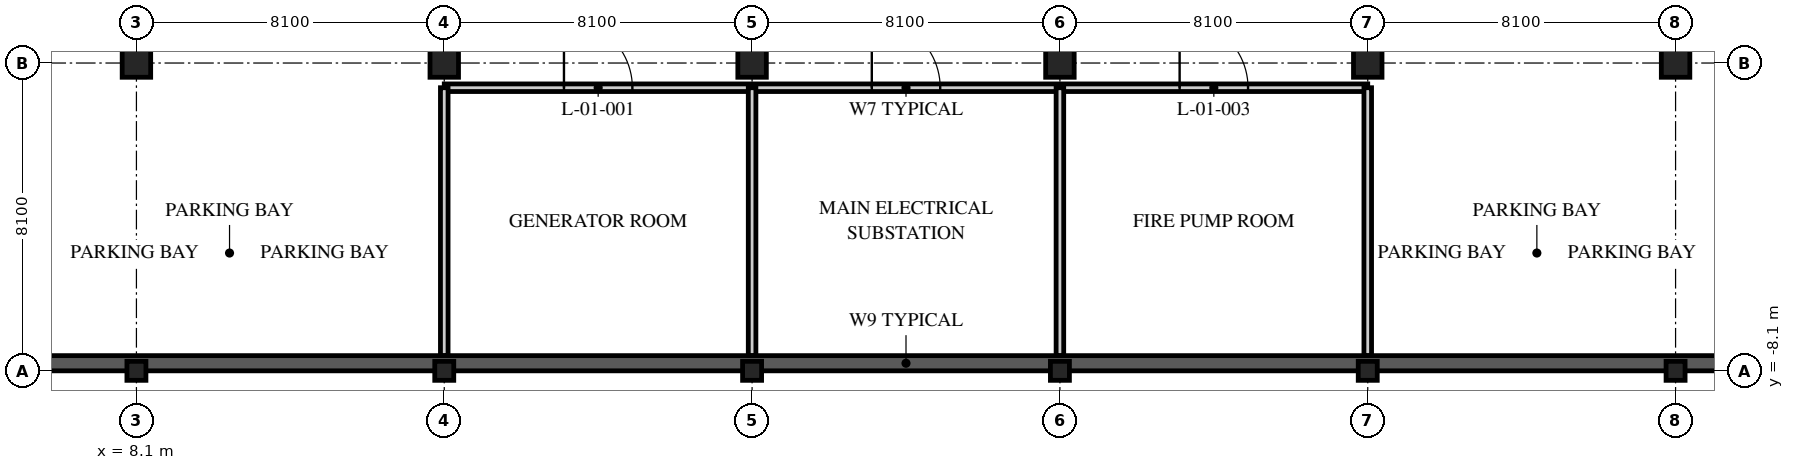
"""IFC4 building model, lengths in metres.
Left out: names, types, materials, properties, quantities, classifications, styles, units other than length and angle.
Written with IfcOpenShell. Run it as: python <this file> out.ifc"""

import sys

from ifc_helpers import new_model, si_unit, direction, frame, frame_2d, origin, origin_2d, place, context, subcontext, project, spatial, rectangle, hollow_rectangle, extrude, element, fill, save


model = new_model("IFC4")
c1 = context("Model", 3, precision=1e-05, world=origin(), true_north=direction((0.0, 1.0)))
c2 = subcontext(c1, "Body", "Model", "MODEL_VIEW")
j1 = project(units=[si_unit("LENGTHUNIT", "METRE"), si_unit("PLANEANGLEUNIT", "RADIAN")], contexts=[c1])
p1 = place(None, origin())
s1 = spatial("IfcSite", under=j1, at=p1, CompositionType="ELEMENT")
p2 = place(p1, origin())
s2 = spatial("IfcBuilding", under=s1, at=p2, CompositionType="ELEMENT")
p3 = place(p2, frame((0.0, 0.0, -4.2)))
s3 = spatial("IfcBuildingStorey", under=s2, at=p3, CompositionType="ELEMENT", Elevation=-4.2)
p4 = place(p3, frame((8.1, -8.1, 0.0), z_axis=(0.0, 0.0, 1.0), x_axis=(1.0, 0.0, 0.0)))
e1 = element("IfcColumn", 1, at=p4, inside=s3, PredefinedType="COLUMN", context=c2, shape_type="SweptSolid", body=[
    extrude(hollow_rectangle(XDim=0.5, YDim=0.5, WallThickness=0.03, at=origin_2d()), origin(), (0.0, 0.0, 1.0), 4.2),
])
p5 = place(p3, frame((8.1, 0.0, 0.0), z_axis=(0.0, 0.0, 1.0), x_axis=(1.0, 0.0, 0.0)))
e2 = element("IfcColumn", 2, at=p5, inside=s3, PredefinedType="COLUMN", context=c2, shape_type="SweptSolid", body=[
    extrude(hollow_rectangle(XDim=0.75, YDim=0.75, WallThickness=0.07, at=origin_2d()), origin(), (0.0, 0.0, 1.0), 4.2),
])
p6 = place(p3, frame((16.2, -8.1, 0.0), z_axis=(0.0, 0.0, 1.0), x_axis=(1.0, 0.0, 0.0)))
e3 = element("IfcColumn", 3, at=p6, inside=s3, PredefinedType="COLUMN", context=c2, shape_type="SweptSolid", body=[
    extrude(hollow_rectangle(XDim=0.5, YDim=0.5, WallThickness=0.03, at=origin_2d()), origin(), (0.0, 0.0, 1.0), 4.2),
])
p7 = place(p3, frame((16.2, 0.0, 0.0), z_axis=(0.0, 0.0, 1.0), x_axis=(1.0, 0.0, 0.0)))
e4 = element("IfcColumn", 4, at=p7, inside=s3, PredefinedType="COLUMN", context=c2, shape_type="SweptSolid", body=[
    extrude(hollow_rectangle(XDim=0.75, YDim=0.75, WallThickness=0.07, at=origin_2d()), origin(), (0.0, 0.0, 1.0), 4.2),
])
p8 = place(p3, frame((24.3, -8.1, 0.0), z_axis=(0.0, 0.0, 1.0), x_axis=(1.0, 0.0, 0.0)))
e5 = element("IfcColumn", 5, at=p8, inside=s3, PredefinedType="COLUMN", context=c2, shape_type="SweptSolid", body=[
    extrude(hollow_rectangle(XDim=0.5, YDim=0.5, WallThickness=0.03, at=origin_2d()), origin(), (0.0, 0.0, 1.0), 4.2),
])
p9 = place(p3, frame((24.3, 0.0, 0.0), z_axis=(0.0, 0.0, 1.0), x_axis=(1.0, 0.0, 0.0)))
e6 = element("IfcColumn", 6, at=p9, inside=s3, PredefinedType="COLUMN", context=c2, shape_type="SweptSolid", body=[
    extrude(hollow_rectangle(XDim=0.75, YDim=0.75, WallThickness=0.07, at=origin_2d()), origin(), (0.0, 0.0, 1.0), 4.2),
])
p10 = place(p3, frame((32.4, -8.1, 0.0), z_axis=(0.0, 0.0, 1.0), x_axis=(1.0, 0.0, 0.0)))
e7 = element("IfcColumn", 7, at=p10, inside=s3, PredefinedType="COLUMN", context=c2, shape_type="SweptSolid", body=[
    extrude(hollow_rectangle(XDim=0.5, YDim=0.5, WallThickness=0.03, at=origin_2d()), origin(), (0.0, 0.0, 1.0), 4.2),
])
p11 = place(p3, frame((32.4, 0.0, 0.0), z_axis=(0.0, 0.0, 1.0), x_axis=(1.0, 0.0, 0.0)))
e8 = element("IfcColumn", 8, at=p11, inside=s3, PredefinedType="COLUMN", context=c2, shape_type="SweptSolid", body=[
    extrude(hollow_rectangle(XDim=0.75, YDim=0.75, WallThickness=0.07, at=origin_2d()), origin(), (0.0, 0.0, 1.0), 4.2),
])
p12 = place(p3, frame((40.5, -8.1, 0.0), z_axis=(0.0, 0.0, 1.0), x_axis=(1.0, 0.0, 0.0)))
e9 = element("IfcColumn", 9, at=p12, inside=s3, PredefinedType="COLUMN", context=c2, shape_type="SweptSolid", body=[
    extrude(hollow_rectangle(XDim=0.5, YDim=0.5, WallThickness=0.03, at=origin_2d()), origin(), (0.0, 0.0, 1.0), 4.2),
])
p13 = place(p3, frame((40.5, 0.0, 0.0), z_axis=(0.0, 0.0, 1.0), x_axis=(1.0, 0.0, 0.0)))
e10 = element("IfcColumn", 10, at=p13, inside=s3, PredefinedType="COLUMN", context=c2, shape_type="SweptSolid", body=[
    extrude(hollow_rectangle(XDim=0.75, YDim=0.75, WallThickness=0.07, at=origin_2d()), origin(), (0.0, 0.0, 1.0), 4.2),
])
p14 = place(p3, frame((48.6, -8.1, 0.0), z_axis=(0.0, 0.0, 1.0), x_axis=(1.0, 0.0, 0.0)))
e11 = element("IfcColumn", 11, at=p14, inside=s3, PredefinedType="COLUMN", context=c2, shape_type="SweptSolid", body=[
    extrude(hollow_rectangle(XDim=0.5, YDim=0.5, WallThickness=0.03, at=origin_2d()), origin(), (0.0, 0.0, 1.0), 4.2),
])
p15 = place(p3, frame((48.6, 0.0, 0.0), z_axis=(0.0, 0.0, 1.0), x_axis=(1.0, 0.0, 0.0)))
e12 = element("IfcColumn", 12, at=p15, inside=s3, PredefinedType="COLUMN", context=c2, shape_type="SweptSolid", body=[
    extrude(hollow_rectangle(XDim=0.75, YDim=0.75, WallThickness=0.07, at=origin_2d()), origin(), (0.0, 0.0, 1.0), 4.2),
])
p16 = place(p3, frame((16.2, -0.65, 0.0), z_axis=(0.0, 0.0, 1.0), x_axis=(1.0, 0.0, 0.0)))
e13 = element("IfcWall", 13, at=p16, inside=s3, PredefinedType="SOLIDWALL", context=c2, shape_type="SweptSolid", body=[
    extrude(rectangle(XDim=24.3, YDim=0.2, at=frame_2d((12.15, 0.0))), origin(), (0.0, 0.0, 1.0), 3.95),
])
p17 = place(p16, frame((3.15, 0.0, 0.0)))
e14 = element("IfcOpeningElement", 14, at=p17, cuts=e13, PredefinedType="OPENING", context=c2, shape_type="SweptSolid", body=[
    extrude(rectangle(XDim=1.8, YDim=2.4, at=frame_2d((0.9, 1.2))), frame((0.0, 0.11, 0.0), z_axis=(0.0, -1.0, 0.0), x_axis=(1.0, 0.0, 0.0)), (0.0, 0.0, 1.0), 0.22),
])
p18 = place(p16, frame((11.25, 0.0, 0.0)))
e15 = element("IfcOpeningElement", 15, at=p18, cuts=e13, PredefinedType="OPENING", context=c2, shape_type="SweptSolid", body=[
    extrude(rectangle(XDim=1.8, YDim=2.4, at=frame_2d((0.9, 1.2))), frame((0.0, 0.11, 0.0), z_axis=(0.0, -1.0, 0.0), x_axis=(1.0, 0.0, 0.0)), (0.0, 0.0, 1.0), 0.22),
])
p19 = place(p16, frame((19.35, 0.0, 0.0)))
e16 = element("IfcOpeningElement", 16, at=p19, cuts=e13, PredefinedType="OPENING", context=c2, shape_type="SweptSolid", body=[
    extrude(rectangle(XDim=1.8, YDim=2.4, at=frame_2d((0.9, 1.2))), frame((0.0, 0.11, 0.0), z_axis=(0.0, -1.0, 0.0), x_axis=(1.0, 0.0, 0.0)), (0.0, 0.0, 1.0), 0.22),
])
for number, where, z_axis, x_axis in (
    (17, (16.2, -7.7, 0.0), (0.0, 0.0, 1.0), (0.0, 1.0, 0.0)),
    (18, (24.3, -7.7, 0.0), (0.0, 0.0, 1.0), (0.0, 1.0, 0.0)),
    (19, (32.4, -7.7, 0.0), (0.0, 0.0, 1.0), (0.0, 1.0, 0.0)),
    (20, (40.5, -7.7, 0.0), (0.0, 0.0, 1.0), (0.0, 1.0, 0.0)),
):
    element("IfcWall", number, at=place(p3, frame(where, z_axis=z_axis, x_axis=x_axis)), inside=s3, PredefinedType="SOLIDWALL", context=c2, shape_type="SweptSolid", body=[
        extrude(rectangle(XDim=7.05, YDim=0.2, at=frame_2d((3.525, 0.0))), origin(), (0.0, 0.0, 1.0), 3.338),
    ])
p20 = place(p3, frame((-7.9, -7.9, 0.0), z_axis=(0.0, 0.0, 1.0), x_axis=(1.0, 0.0, 0.0)))
e21 = element("IfcWall", 21, at=p20, inside=s3, PredefinedType="SOLIDWALL", context=c2, shape_type="SweptSolid", body=[
    extrude(rectangle(XDim=72.5, YDim=0.4, at=frame_2d((36.25, 0.0))), origin(), (0.0, 0.0, 1.0), 3.338),
])
p21 = place(p17, origin())
e22 = element("IfcDoor", 22, at=p21, inside=s3, OperationType="DOUBLE_DOOR_SINGLE_SWING", PredefinedType="DOOR", context=c2, shape_type="SweptSolid", body=[
    extrude(rectangle(XDim=1.8, YDim=2.4, at=frame_2d((0.9, 1.2))), frame((0.0, 0.025, 0.0), z_axis=(0.0, -1.0, 0.0), x_axis=(1.0, 0.0, 0.0)), (0.0, 0.0, 1.0), 0.05),
])
fill(e14, e22)
p22 = place(p18, origin())
e23 = element("IfcDoor", 23, at=p22, inside=s3, OperationType="DOUBLE_DOOR_SINGLE_SWING", PredefinedType="DOOR", context=c2, shape_type="SweptSolid", body=[
    extrude(rectangle(XDim=1.8, YDim=2.4, at=frame_2d((0.9, 1.2))), frame((0.0, 0.025, 0.0), z_axis=(0.0, -1.0, 0.0), x_axis=(1.0, 0.0, 0.0)), (0.0, 0.0, 1.0), 0.05),
])
fill(e15, e23)
p23 = place(p19, origin())
e24 = element("IfcDoor", 24, at=p23, inside=s3, OperationType="DOUBLE_DOOR_SINGLE_SWING", PredefinedType="DOOR", context=c2, shape_type="SweptSolid", body=[
    extrude(rectangle(XDim=1.8, YDim=2.4, at=frame_2d((0.9, 1.2))), frame((0.0, 0.025, 0.0), z_axis=(0.0, -1.0, 0.0), x_axis=(1.0, 0.0, 0.0)), (0.0, 0.0, 1.0), 0.05),
])
fill(e16, e24)
save(model, sys.argv[1])
